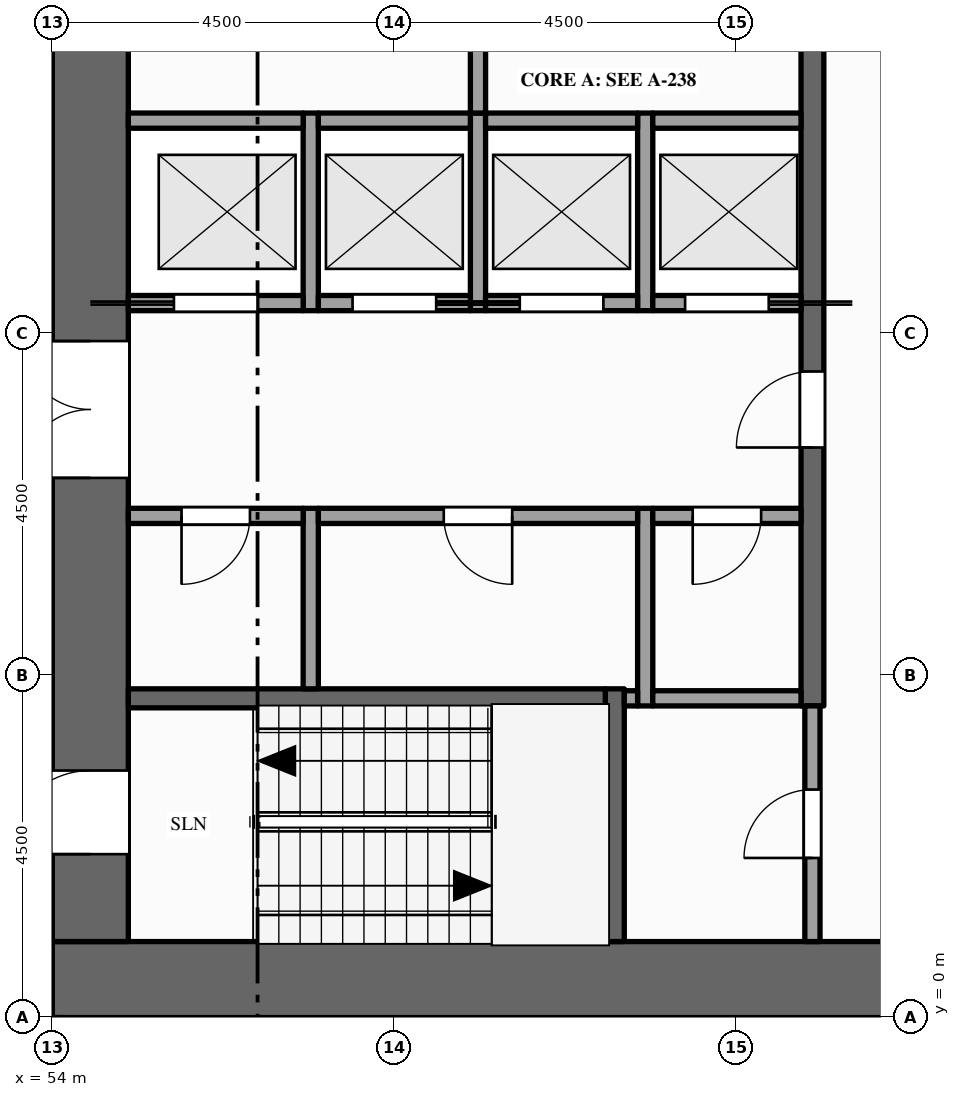
"""IFC4 building model, lengths in metres.
Left out: names, types, materials, properties, quantities, classifications, styles, units other than length and angle.
Written with IfcOpenShell. Run it as: python <this file> out.ifc"""

import sys

from ifc_helpers import new_model, si_unit, direction, frame, frame_2d, origin, place, context, subcontext, project, spatial, rectangle, extrude, element, fill, save


model = new_model("IFC4")
c1 = context("Model", 3, precision=1e-05, world=origin(), true_north=direction((0.0, 1.0)))
c2 = subcontext(c1, "Body", "Model", "MODEL_VIEW")
j1 = project(units=[si_unit("LENGTHUNIT", "METRE"), si_unit("PLANEANGLEUNIT", "RADIAN")], contexts=[c1])
p1 = place(None, origin())
s1 = spatial("IfcSite", under=j1, at=p1, CompositionType="ELEMENT")
p2 = place(p1, origin())
s2 = spatial("IfcBuilding", under=s1, at=p2, CompositionType="ELEMENT")
p3 = place(p2, frame((0.0, 0.0, 211.0)))
s3 = spatial("IfcBuildingStorey", under=s2, at=p3, CompositionType="ELEMENT", Elevation=211.0)
p4 = place(p3, frame((67.5, 0.5, -0.15), z_axis=(0.0, 0.0, 1.0), x_axis=(-1.0, 0.0, 0.0)))
e1 = element("IfcWall", 1, at=p4, inside=s3, PredefinedType="SHEAR", context=c2, shape_type="SweptSolid", body=[
    extrude(rectangle(XDim=13.5, YDim=1.0, at=frame_2d((6.75, 0.0))), origin(), (0.0, 0.0, 1.0), 4.0),
])
p5 = place(p3, frame((54.5, 1.0, -0.15), z_axis=(0.0, 0.0, 1.0), x_axis=(0.0, 1.0, 0.0)))
e2 = element("IfcWall", 2, at=p5, inside=s3, PredefinedType="SHEAR", context=c2, shape_type="SweptSolid", body=[
    extrude(rectangle(XDim=20.5, YDim=1.0, at=frame_2d((10.25, 0.0))), origin(), (0.0, 0.0, 1.0), 4.0),
])
p6 = place(p5, frame((6.1, 0.0, 0.15)))
e3 = element("IfcOpeningElement", 3, at=p6, cuts=e2, PredefinedType="OPENING", context=c2, shape_type="SweptSolid", body=[
    extrude(rectangle(XDim=1.8, YDim=2.1, at=frame_2d((0.9, 1.05))), frame((0.0, 0.51, 0.0), z_axis=(0.0, -1.0, 0.0), x_axis=(1.0, 0.0, 0.0)), (0.0, 0.0, 1.0), 1.02),
])
p7 = place(p5, frame((12.15, 0.0, 0.15)))
e4 = element("IfcOpeningElement", 4, at=p7, cuts=e2, PredefinedType="OPENING", context=c2, shape_type="SweptSolid", body=[
    extrude(rectangle(XDim=1.1, YDim=2.1, at=frame_2d((0.55, 1.05))), frame((0.0, 0.51, 0.0), z_axis=(0.0, -1.0, 0.0), x_axis=(1.0, 0.0, 0.0)), (0.0, 0.0, 1.0), 1.02),
])
p8 = place(p5, frame((1.15, 0.0, 0.15)))
e5 = element("IfcOpeningElement", 5, at=p8, cuts=e2, PredefinedType="OPENING", context=c2, shape_type="SweptSolid", body=[
    extrude(rectangle(XDim=1.1, YDim=2.1, at=frame_2d((0.55, 1.05))), frame((0.0, 0.51, 0.0), z_axis=(0.0, -1.0, 0.0), x_axis=(1.0, 0.0, 0.0)), (0.0, 0.0, 1.0), 1.02),
])
p9 = place(p5, frame((18.35, 0.0, 0.15)))
e6 = element("IfcOpeningElement", 6, at=p9, cuts=e2, PredefinedType="OPENING", context=c2, shape_type="SweptSolid", body=[
    extrude(rectangle(XDim=1.1, YDim=2.1, at=frame_2d((0.55, 1.05))), frame((0.0, 0.51, 0.0), z_axis=(0.0, -1.0, 0.0), x_axis=(1.0, 0.0, 0.0)), (0.0, 0.0, 1.0), 1.02),
])
p10 = place(p3, frame((57.4, 4.325, 0.0), z_axis=(0.0, 0.0, 1.0), x_axis=(0.0, 1.0, 0.0)))
e7 = element("IfcWall", 7, at=p10, inside=s3, PredefinedType="PARTITIONING", context=c2, shape_type="SweptSolid", body=[
    extrude(rectangle(XDim=2.375, YDim=0.2, at=frame_2d((1.188, 0.0))), origin(), (0.0, 0.0, 1.0), 3.85),
])
for number, where, z_axis, x_axis in (
    (8, (57.4, 9.3, 0.0), (0.0, 0.0, 1.0), (0.0, 1.0, 0.0)),
    (9, (59.6, 9.3, 0.0), (0.0, 0.0, 1.0), (0.0, 1.0, 0.0)),
):
    element("IfcWall", number, at=place(p3, frame(where, z_axis=z_axis, x_axis=x_axis)), inside=s3, PredefinedType="SOLIDWALL", context=c2, shape_type="SweptSolid", body=[
        extrude(rectangle(XDim=2.6, YDim=0.2, at=frame_2d((1.3, 0.0))), origin(), (0.0, 0.0, 1.0), 3.85),
    ])
p11 = place(p3, frame((59.6, 11.9, 0.0), z_axis=(0.0, 0.0, 1.0), x_axis=(0.0, 1.0, 0.0)))
e10 = element("IfcWall", 10, at=p11, inside=s3, PredefinedType="PARTITIONING", context=c2, shape_type="SweptSolid", body=[
    extrude(rectangle(XDim=3.6, YDim=0.2, at=frame_2d((1.8, 0.0))), origin(), (0.0, 0.0, 1.0), 3.85),
])
p12 = place(p11, frame((1.3, 0.0, 0.0)))
e11 = element("IfcOpeningElement", 11, at=p12, cuts=e10, PredefinedType="OPENING", context=c2, shape_type="SweptSolid", body=[
    extrude(rectangle(XDim=1.0, YDim=2.1, at=frame_2d((0.5, 1.05))), frame((0.0, 0.11, 0.0), z_axis=(0.0, -1.0, 0.0), x_axis=(1.0, 0.0, 0.0)), (0.0, 0.0, 1.0), 0.22),
])
p13 = place(p3, frame((61.4, 1.0, 0.0), z_axis=(0.0, 0.0, 1.0), x_axis=(0.0, 1.0, 0.0)))
e12 = element("IfcWall", 12, at=p13, inside=s3, PredefinedType="SHEAR", context=c2, shape_type="SweptSolid", body=[
    extrude(rectangle(XDim=3.325, YDim=0.25, at=frame_2d((1.663, 0.0))), origin(), (0.0, 0.0, 1.0), 3.85),
])
p14 = place(p3, frame((61.8, 4.1, 0.0), z_axis=(0.0, 0.0, 1.0), x_axis=(0.0, 1.0, 0.0)))
e13 = element("IfcWall", 13, at=p14, inside=s3, PredefinedType="PARTITIONING", context=c2, shape_type="SweptSolid", body=[
    extrude(rectangle(XDim=2.6, YDim=0.2, at=frame_2d((1.3, 0.0))), origin(), (0.0, 0.0, 1.0), 3.85),
])
p15 = place(p3, frame((61.8, 9.3, 0.0), z_axis=(0.0, 0.0, 1.0), x_axis=(0.0, 1.0, 0.0)))
e14 = element("IfcWall", 14, at=p15, inside=s3, PredefinedType="SOLIDWALL", context=c2, shape_type="SweptSolid", body=[
    extrude(rectangle(XDim=2.6, YDim=0.2, at=frame_2d((1.3, 0.0))), origin(), (0.0, 0.0, 1.0), 3.85),
])
p16 = place(p3, frame((64.0, 1.0, 0.0), z_axis=(0.0, 0.0, 1.0), x_axis=(0.0, 1.0, 0.0)))
e15 = element("IfcWall", 15, at=p16, inside=s3, PredefinedType="PARTITIONING", context=c2, shape_type="SweptSolid", body=[
    extrude(rectangle(XDim=3.1, YDim=0.2, at=frame_2d((1.55, 0.0))), origin(), (0.0, 0.0, 1.0), 3.85),
])
p17 = place(p16, frame((1.1, 0.0, 0.0)))
e16 = element("IfcOpeningElement", 16, at=p17, cuts=e15, PredefinedType="OPENING", context=c2, shape_type="SweptSolid", body=[
    extrude(rectangle(XDim=0.9, YDim=2.1, at=frame_2d((0.45, 1.05))), frame((0.0, 0.11, 0.0), z_axis=(0.0, -1.0, 0.0), x_axis=(1.0, 0.0, 0.0)), (0.0, 0.0, 1.0), 0.22),
])
p18 = place(p3, frame((64.0, 4.1, 0.0), z_axis=(0.0, 0.0, 1.0), x_axis=(0.0, 1.0, 0.0)))
e17 = element("IfcWall", 17, at=p18, inside=s3, PredefinedType="SHEAR", context=c2, shape_type="SweptSolid", body=[
    extrude(rectangle(XDim=14.5, YDim=0.3, at=frame_2d((7.25, 0.0))), origin(), (0.0, 0.0, 1.0), 3.85),
])
p19 = place(p18, frame((3.4, 0.0, 0.0)))
e18 = element("IfcOpeningElement", 18, at=p19, cuts=e17, PredefinedType="OPENING", context=c2, shape_type="SweptSolid", body=[
    extrude(rectangle(XDim=1.0, YDim=2.1, at=frame_2d((0.5, 1.05))), frame((0.0, 0.16, 0.0), z_axis=(0.0, -1.0, 0.0), x_axis=(1.0, 0.0, 0.0)), (0.0, 0.0, 1.0), 0.32),
])
p20 = place(p18, frame((9.1, 0.0, 0.0)))
e19 = element("IfcOpeningElement", 19, at=p20, cuts=e17, PredefinedType="OPENING", context=c2, shape_type="SweptSolid", body=[
    extrude(rectangle(XDim=1.0, YDim=2.1, at=frame_2d((0.5, 1.05))), frame((0.0, 0.16, 0.0), z_axis=(0.0, -1.0, 0.0), x_axis=(1.0, 0.0, 0.0)), (0.0, 0.0, 1.0), 0.32),
])
p21 = place(p3, frame((55.0, 4.2, 0.0), z_axis=(0.0, 0.0, 1.0), x_axis=(1.0, 0.0, 0.0)))
e20 = element("IfcWall", 20, at=p21, inside=s3, PredefinedType="SHEAR", context=c2, shape_type="SweptSolid", body=[
    extrude(rectangle(XDim=6.275, YDim=0.25, at=frame_2d((3.137, 0.0))), origin(), (0.0, 0.0, 1.0), 3.85),
])
p22 = place(p3, frame((61.525, 4.2, 0.0), z_axis=(0.0, 0.0, 1.0), x_axis=(1.0, 0.0, 0.0)))
e21 = element("IfcWall", 21, at=p22, inside=s3, PredefinedType="PARTITIONING", context=c2, shape_type="SweptSolid", body=[
    extrude(rectangle(XDim=0.175, YDim=0.2, at=frame_2d((0.087, 0.0))), origin(), (0.0, 0.0, 1.0), 3.85),
])
p23 = place(p3, frame((61.9, 4.2, 0.0), z_axis=(0.0, 0.0, 1.0), x_axis=(1.0, 0.0, 0.0)))
e22 = element("IfcWall", 22, at=p23, inside=s3, PredefinedType="PARTITIONING", context=c2, shape_type="SweptSolid", body=[
    extrude(rectangle(XDim=1.95, YDim=0.2, at=frame_2d((0.975, 0.0))), origin(), (0.0, 0.0, 1.0), 3.85),
])
p24 = place(p3, frame((55.0, 6.6, 0.0), z_axis=(0.0, 0.0, 1.0), x_axis=(1.0, 0.0, 0.0)))
e23 = element("IfcWall", 23, at=p24, inside=s3, PredefinedType="PARTITIONING", context=c2, shape_type="SweptSolid", body=[
    extrude(rectangle(XDim=2.3, YDim=0.2, at=frame_2d((1.15, 0.0))), origin(), (0.0, 0.0, 1.0), 3.85),
])
p25 = place(p24, frame((0.7, 0.0, 0.0)))
e24 = element("IfcOpeningElement", 24, at=p25, cuts=e23, PredefinedType="OPENING", context=c2, shape_type="SweptSolid", body=[
    extrude(rectangle(XDim=0.9, YDim=2.1, at=frame_2d((0.45, 1.05))), frame((0.0, 0.11, 0.0), z_axis=(0.0, -1.0, 0.0), x_axis=(1.0, 0.0, 0.0)), (0.0, 0.0, 1.0), 0.22),
])
p26 = place(p3, frame((57.5, 6.6, 0.0), z_axis=(0.0, 0.0, 1.0), x_axis=(1.0, 0.0, 0.0)))
e25 = element("IfcWall", 25, at=p26, inside=s3, PredefinedType="PARTITIONING", context=c2, shape_type="SweptSolid", body=[
    extrude(rectangle(XDim=4.2, YDim=0.2, at=frame_2d((2.1, 0.0))), origin(), (0.0, 0.0, 1.0), 3.85),
])
p27 = place(p26, frame((1.65, 0.0, 0.0)))
e26 = element("IfcOpeningElement", 26, at=p27, cuts=e25, PredefinedType="OPENING", context=c2, shape_type="SweptSolid", body=[
    extrude(rectangle(XDim=0.9, YDim=2.1, at=frame_2d((0.45, 1.05))), frame((0.0, 0.11, 0.0), z_axis=(0.0, -1.0, 0.0), x_axis=(1.0, 0.0, 0.0)), (0.0, 0.0, 1.0), 0.22),
])
p28 = place(p3, frame((61.9, 6.6, 0.0), z_axis=(0.0, 0.0, 1.0), x_axis=(1.0, 0.0, 0.0)))
e27 = element("IfcWall", 27, at=p28, inside=s3, PredefinedType="PARTITIONING", context=c2, shape_type="SweptSolid", body=[
    extrude(rectangle(XDim=1.95, YDim=0.2, at=frame_2d((0.975, 0.0))), origin(), (0.0, 0.0, 1.0), 3.85),
])
p29 = place(p28, frame((0.525, 0.0, 0.0)))
e28 = element("IfcOpeningElement", 28, at=p29, cuts=e27, PredefinedType="OPENING", context=c2, shape_type="SweptSolid", body=[
    extrude(rectangle(XDim=0.9, YDim=2.1, at=frame_2d((0.45, 1.05))), frame((0.0, 0.11, 0.0), z_axis=(0.0, -1.0, 0.0), x_axis=(1.0, 0.0, 0.0)), (0.0, 0.0, 1.0), 0.22),
])
p30 = place(p3, frame((55.0, 9.4, 0.0), z_axis=(0.0, 0.0, 1.0), x_axis=(1.0, 0.0, 0.0)))
e29 = element("IfcWall", 29, at=p30, inside=s3, PredefinedType="SOLIDWALL", context=c2, shape_type="SweptSolid", body=[
    extrude(rectangle(XDim=2.3, YDim=0.2, at=frame_2d((1.15, 0.0))), origin(), (0.0, 0.0, 1.0), 3.85),
])
p31 = place(p30, frame((0.6, 0.0, 0.012)))
e30 = element("IfcOpeningElement", 30, at=p31, cuts=e29, PredefinedType="OPENING", context=c2, shape_type="SweptSolid", body=[
    extrude(rectangle(XDim=1.1, YDim=2.1, at=frame_2d((0.55, 1.05))), frame((0.0, 0.11, 0.0), z_axis=(0.0, -1.0, 0.0), x_axis=(1.0, 0.0, 0.0)), (0.0, 0.0, 1.0), 0.22),
])
p32 = place(p3, frame((57.5, 9.4, 0.0), z_axis=(0.0, 0.0, 1.0), x_axis=(1.0, 0.0, 0.0)))
e31 = element("IfcWall", 31, at=p32, inside=s3, PredefinedType="SOLIDWALL", context=c2, shape_type="SweptSolid", body=[
    extrude(rectangle(XDim=2.0, YDim=0.2, at=frame_2d((1.0, 0.0))), origin(), (0.0, 0.0, 1.0), 3.85),
])
p33 = place(p32, frame((0.45, 0.0, 0.012)))
e32 = element("IfcOpeningElement", 32, at=p33, cuts=e31, PredefinedType="OPENING", context=c2, shape_type="SweptSolid", body=[
    extrude(rectangle(XDim=1.1, YDim=2.1, at=frame_2d((0.55, 1.05))), frame((0.0, 0.11, 0.0), z_axis=(0.0, -1.0, 0.0), x_axis=(1.0, 0.0, 0.0)), (0.0, 0.0, 1.0), 0.22),
])
p34 = place(p3, frame((59.7, 9.4, 0.0), z_axis=(0.0, 0.0, 1.0), x_axis=(1.0, 0.0, 0.0)))
e33 = element("IfcWall", 33, at=p34, inside=s3, PredefinedType="SOLIDWALL", context=c2, shape_type="SweptSolid", body=[
    extrude(rectangle(XDim=2.0, YDim=0.2, at=frame_2d((1.0, 0.0))), origin(), (0.0, 0.0, 1.0), 3.85),
])
p35 = place(p34, frame((0.45, 0.0, 0.012)))
e34 = element("IfcOpeningElement", 34, at=p35, cuts=e33, PredefinedType="OPENING", context=c2, shape_type="SweptSolid", body=[
    extrude(rectangle(XDim=1.1, YDim=2.1, at=frame_2d((0.55, 1.05))), frame((0.0, 0.11, 0.0), z_axis=(0.0, -1.0, 0.0), x_axis=(1.0, 0.0, 0.0)), (0.0, 0.0, 1.0), 0.22),
])
p36 = place(p3, frame((61.9, 9.4, 0.0), z_axis=(0.0, 0.0, 1.0), x_axis=(1.0, 0.0, 0.0)))
e35 = element("IfcWall", 35, at=p36, inside=s3, PredefinedType="SOLIDWALL", context=c2, shape_type="SweptSolid", body=[
    extrude(rectangle(XDim=1.95, YDim=0.2, at=frame_2d((0.975, 0.0))), origin(), (0.0, 0.0, 1.0), 3.85),
])
p37 = place(p36, frame((0.425, 0.0, 0.012)))
e36 = element("IfcOpeningElement", 36, at=p37, cuts=e35, PredefinedType="OPENING", context=c2, shape_type="SweptSolid", body=[
    extrude(rectangle(XDim=1.1, YDim=2.1, at=frame_2d((0.55, 1.05))), frame((0.0, 0.11, 0.0), z_axis=(0.0, -1.0, 0.0), x_axis=(1.0, 0.0, 0.0)), (0.0, 0.0, 1.0), 0.22),
])
p38 = place(p3, frame((55.0, 11.8, 0.0), z_axis=(0.0, 0.0, 1.0), x_axis=(1.0, 0.0, 0.0)))
e37 = element("IfcWall", 37, at=p38, inside=s3, PredefinedType="SOLIDWALL", context=c2, shape_type="SweptSolid", body=[
    extrude(rectangle(XDim=2.3, YDim=0.2, at=frame_2d((1.15, 0.0))), origin(), (0.0, 0.0, 1.0), 3.85),
])
for number, where, z_axis, x_axis in (
    (38, (57.5, 11.8, 0.0), (0.0, 0.0, 1.0), (1.0, 0.0, 0.0)),
    (39, (59.7, 11.8, 0.0), (0.0, 0.0, 1.0), (1.0, 0.0, 0.0)),
):
    element("IfcWall", number, at=place(p3, frame(where, z_axis=z_axis, x_axis=x_axis)), inside=s3, PredefinedType="SOLIDWALL", context=c2, shape_type="SweptSolid", body=[
        extrude(rectangle(XDim=2.0, YDim=0.2, at=frame_2d((1.0, 0.0))), origin(), (0.0, 0.0, 1.0), 3.85),
    ])
p39 = place(p3, frame((61.9, 11.8, 0.0), z_axis=(0.0, 0.0, 1.0), x_axis=(1.0, 0.0, 0.0)))
e40 = element("IfcWall", 40, at=p39, inside=s3, PredefinedType="SOLIDWALL", context=c2, shape_type="SweptSolid", body=[
    extrude(rectangle(XDim=1.95, YDim=0.2, at=frame_2d((0.975, 0.0))), origin(), (0.0, 0.0, 1.0), 3.85),
])
p40 = place(p31, origin())
e41 = element("IfcDoor", 41, at=p40, inside=s3, OperationType="SLIDING_TO_LEFT", PredefinedType="DOOR", context=c2, shape_type="SweptSolid", body=[
    extrude(rectangle(XDim=1.1, YDim=2.1, at=frame_2d((0.55, 1.05))), frame((0.0, 0.025, 0.0), z_axis=(0.0, -1.0, 0.0), x_axis=(1.0, 0.0, 0.0)), (0.0, 0.0, 1.0), 0.05),
])
fill(e30, e41)
p41 = place(p33, origin())
e42 = element("IfcDoor", 42, at=p41, inside=s3, OperationType="SLIDING_TO_RIGHT", PredefinedType="DOOR", context=c2, shape_type="SweptSolid", body=[
    extrude(rectangle(XDim=1.1, YDim=2.1, at=frame_2d((0.55, 1.05))), frame((0.0, 0.025, 0.0), z_axis=(0.0, -1.0, 0.0), x_axis=(1.0, 0.0, 0.0)), (0.0, 0.0, 1.0), 0.05),
])
fill(e32, e42)
p42 = place(p35, origin())
e43 = element("IfcDoor", 43, at=p42, inside=s3, OperationType="SLIDING_TO_LEFT", PredefinedType="DOOR", context=c2, shape_type="SweptSolid", body=[
    extrude(rectangle(XDim=1.1, YDim=2.1, at=frame_2d((0.55, 1.05))), frame((0.0, 0.025, 0.0), z_axis=(0.0, -1.0, 0.0), x_axis=(1.0, 0.0, 0.0)), (0.0, 0.0, 1.0), 0.05),
])
fill(e34, e43)
p43 = place(p37, origin())
e44 = element("IfcDoor", 44, at=p43, inside=s3, OperationType="SLIDING_TO_RIGHT", PredefinedType="DOOR", context=c2, shape_type="SweptSolid", body=[
    extrude(rectangle(XDim=1.1, YDim=2.1, at=frame_2d((0.55, 1.05))), frame((0.0, 0.025, 0.0), z_axis=(0.0, -1.0, 0.0), x_axis=(1.0, 0.0, 0.0)), (0.0, 0.0, 1.0), 0.05),
])
fill(e36, e44)
p44 = place(p6, origin())
e45 = element("IfcDoor", 45, at=p44, inside=s3, OperationType="DOUBLE_DOOR_SINGLE_SWING", PredefinedType="DOOR", context=c2, shape_type="SweptSolid", body=[
    extrude(rectangle(XDim=1.8, YDim=2.1, at=frame_2d((0.9, 1.05))), frame((0.0, 0.025, 0.0), z_axis=(0.0, -1.0, 0.0), x_axis=(1.0, 0.0, 0.0)), (0.0, 0.0, 1.0), 0.05),
])
fill(e3, e45)
p45 = place(p19, origin())
e46 = element("IfcDoor", 46, at=p45, inside=s3, OperationType="SINGLE_SWING_LEFT", PredefinedType="DOOR", context=c2, shape_type="SweptSolid", body=[
    extrude(rectangle(XDim=1.0, YDim=2.1, at=frame_2d((0.5, 1.05))), frame((0.0, 0.025, 0.0), z_axis=(0.0, -1.0, 0.0), x_axis=(1.0, 0.0, 0.0)), (0.0, 0.0, 1.0), 0.05),
])
fill(e18, e46)
p46 = place(p8, origin())
e47 = element("IfcDoor", 47, at=p46, inside=s3, OperationType="SINGLE_SWING_LEFT", PredefinedType="DOOR", context=c2, shape_type="SweptSolid", body=[
    extrude(rectangle(XDim=1.1, YDim=2.1, at=frame_2d((0.55, 1.05))), frame((0.0, 0.025, 0.0), z_axis=(0.0, -1.0, 0.0), x_axis=(1.0, 0.0, 0.0)), (0.0, 0.0, 1.0), 0.05),
])
fill(e5, e47)
p47 = place(p17, origin())
e48 = element("IfcDoor", 48, at=p47, inside=s3, OperationType="SINGLE_SWING_LEFT", PredefinedType="DOOR", context=c2, shape_type="SweptSolid", body=[
    extrude(rectangle(XDim=0.9, YDim=2.1, at=frame_2d((0.45, 1.05))), frame((0.0, 0.025, 0.0), z_axis=(0.0, -1.0, 0.0), x_axis=(1.0, 0.0, 0.0)), (0.0, 0.0, 1.0), 0.05),
])
fill(e16, e48)
p48 = place(p25, origin())
e49 = element("IfcDoor", 49, at=p48, inside=s3, OperationType="SINGLE_SWING_LEFT", PredefinedType="DOOR", context=c2, shape_type="SweptSolid", body=[
    extrude(rectangle(XDim=0.9, YDim=2.1, at=frame_2d((0.45, 1.05))), frame((0.0, 0.025, 0.0), z_axis=(0.0, -1.0, 0.0), x_axis=(1.0, 0.0, 0.0)), (0.0, 0.0, 1.0), 0.05),
])
fill(e24, e49)
p49 = place(p27, origin())
e50 = element("IfcDoor", 50, at=p49, inside=s3, OperationType="SINGLE_SWING_RIGHT", PredefinedType="DOOR", context=c2, shape_type="SweptSolid", body=[
    extrude(rectangle(XDim=0.9, YDim=2.1, at=frame_2d((0.45, 1.05))), frame((0.0, 0.025, 0.0), z_axis=(0.0, -1.0, 0.0), x_axis=(1.0, 0.0, 0.0)), (0.0, 0.0, 1.0), 0.05),
])
fill(e26, e50)
p50 = place(p29, origin())
e51 = element("IfcDoor", 51, at=p50, inside=s3, OperationType="SINGLE_SWING_LEFT", PredefinedType="DOOR", context=c2, shape_type="SweptSolid", body=[
    extrude(rectangle(XDim=0.9, YDim=2.1, at=frame_2d((0.45, 1.05))), frame((0.0, 0.025, 0.0), z_axis=(0.0, -1.0, 0.0), x_axis=(1.0, 0.0, 0.0)), (0.0, 0.0, 1.0), 0.05),
])
fill(e28, e51)
save(model, sys.argv[1])
